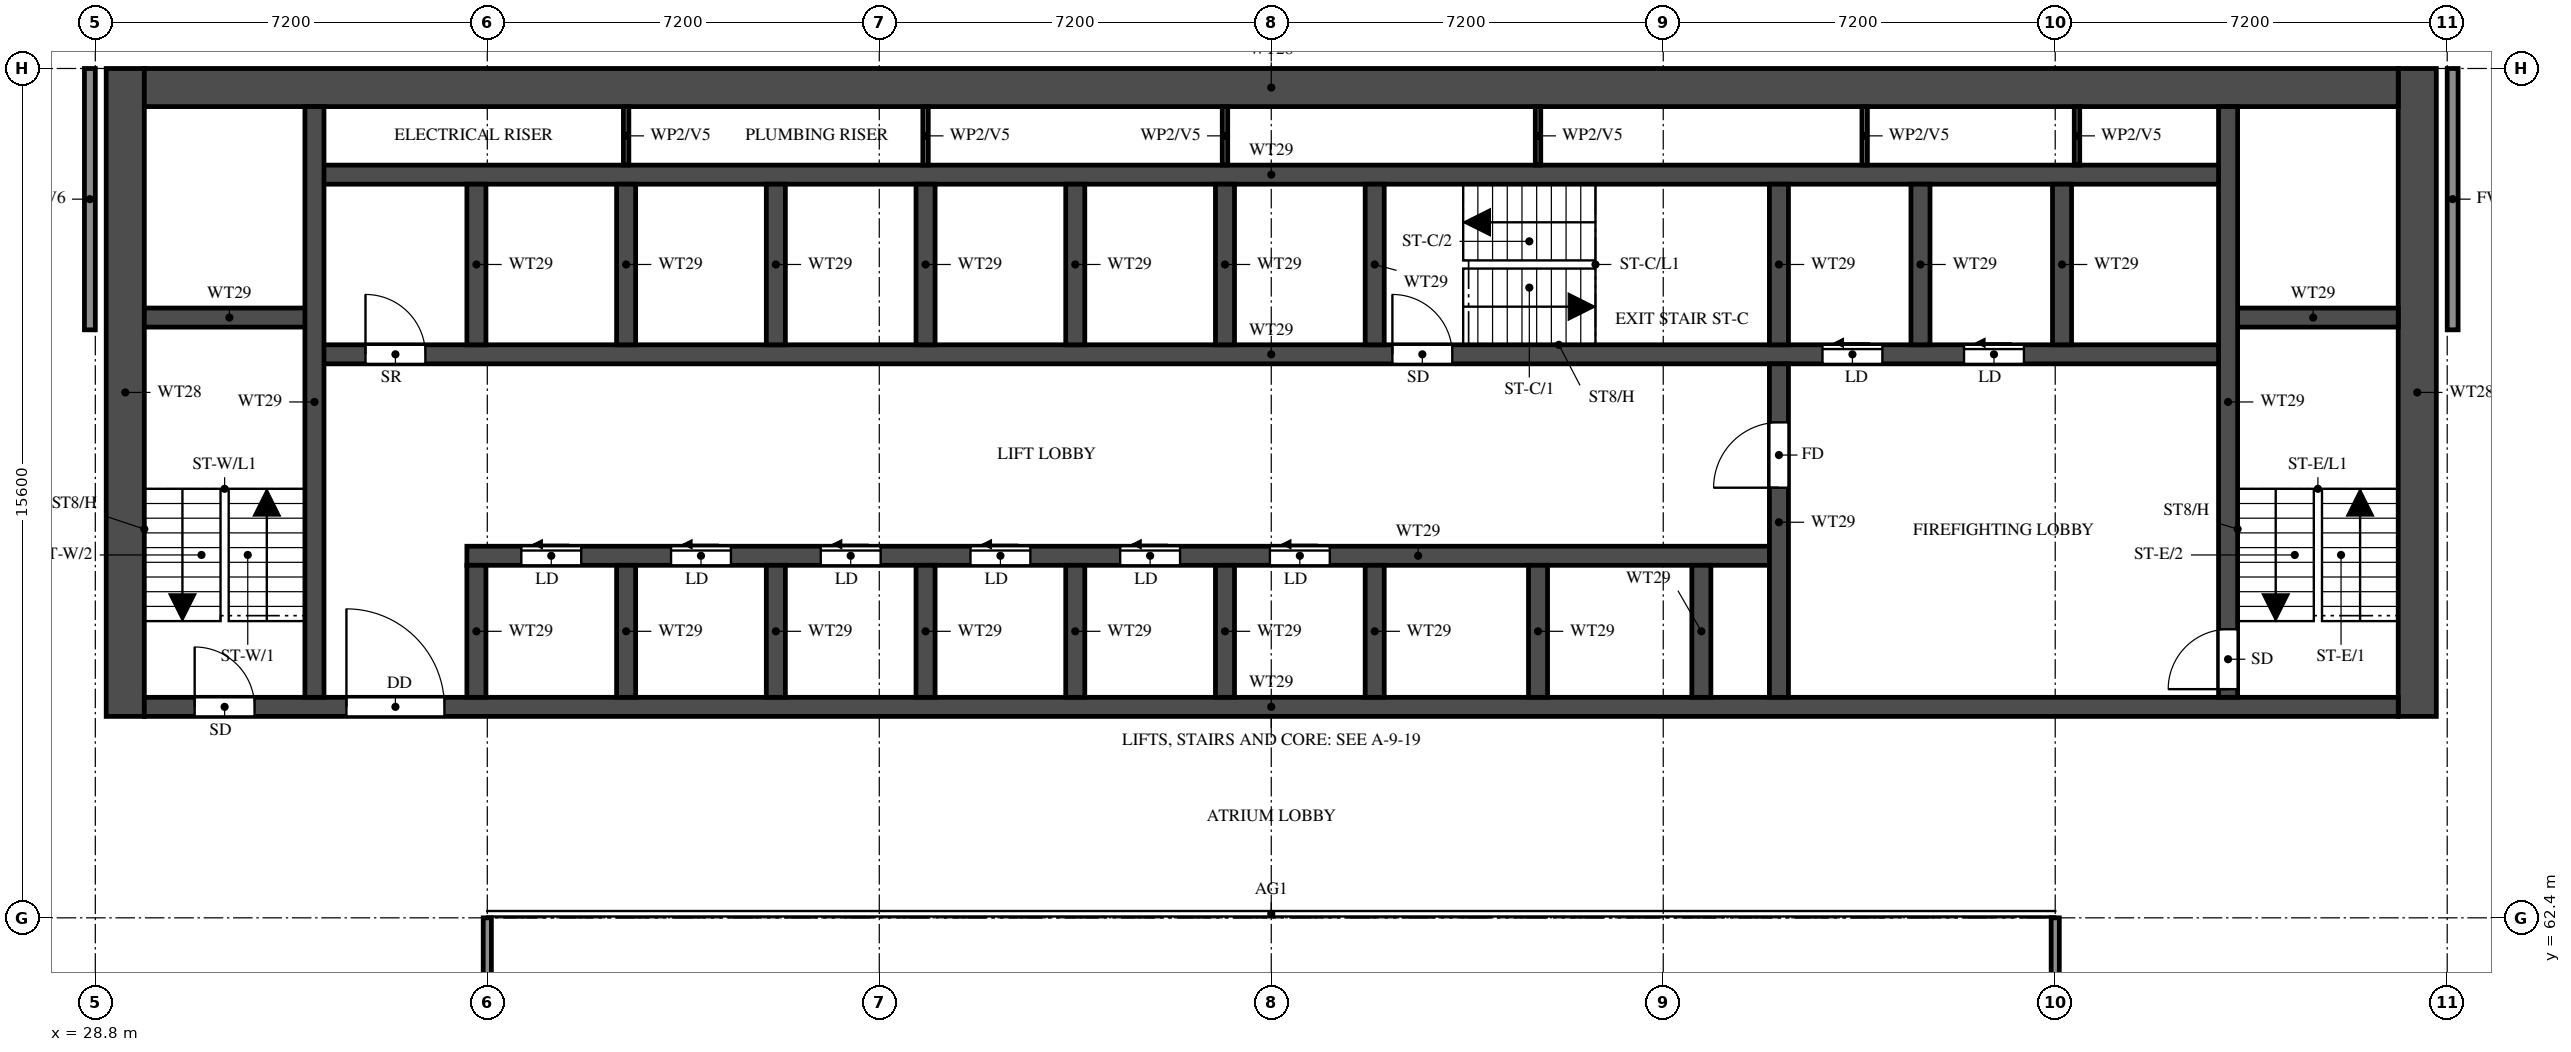
"""IFC4 building model, lengths in metres.
Left out: names, types, materials, properties, quantities, classifications, styles, units other than length and angle.
Written with IfcOpenShell. Run it as: python <this file> out.ifc"""

import sys

from ifc_helpers import new_model, si_unit, direction, frame, frame_2d, origin, place, context, subcontext, project, spatial, rectangle, extrude, element, fill, save


model = new_model("IFC4")
c1 = context("Model", 3, precision=1e-05, world=origin(), true_north=direction((0.0, 1.0)))
c2 = subcontext(c1, "Body", "Model", "MODEL_VIEW")
j1 = project(units=[si_unit("LENGTHUNIT", "METRE"), si_unit("PLANEANGLEUNIT", "RADIAN")], contexts=[c1])
p1 = place(None, origin())
s1 = spatial("IfcSite", under=j1, at=p1, CompositionType="ELEMENT")
p2 = place(p1, origin())
s2 = spatial("IfcBuilding", under=s1, at=p2, CompositionType="ELEMENT")
p3 = place(p2, frame((0.0, 0.0, 134.0)))
s3 = spatial("IfcBuildingStorey", under=s2, at=p3, CompositionType="ELEMENT", Elevation=134.0)
for number, where, z_axis, x_axis in (
    (1, (29.35, 66.1, 0.0), (0.0, 0.0, 1.0), (0.0, 1.0, 0.0)),
    (2, (71.45, 66.1, 0.0), (0.0, 0.0, 1.0), (0.0, 1.0, 0.0)),
):
    element("IfcWall", number, at=place(p3, frame(where, z_axis=z_axis, x_axis=x_axis)), inside=s3, PredefinedType="SHEAR", context=c2, shape_type="SweptSolid", body=[
        extrude(rectangle(XDim=11.9, YDim=0.7, at=frame_2d((5.95, 0.0))), origin(), (0.0, 0.0, 1.0), 3.15),
    ])
p4 = place(p3, frame((29.7, 77.65, 0.0), z_axis=(0.0, 0.0, 1.0), x_axis=(1.0, 0.0, 0.0)))
e3 = element("IfcWall", 3, at=p4, inside=s3, PredefinedType="SHEAR", context=c2, shape_type="SweptSolid", body=[
    extrude(rectangle(XDim=41.4, YDim=0.7, at=frame_2d((20.7, 0.0))), origin(), (0.0, 0.0, 1.0), 3.15),
])
p5 = place(p3, frame((29.7, 66.275, 0.0), z_axis=(0.0, 0.0, 1.0), x_axis=(1.0, 0.0, 0.0)))
e4 = element("IfcWall", 4, at=p5, inside=s3, PredefinedType="SHEAR", context=c2, shape_type="SweptSolid", body=[
    extrude(rectangle(XDim=41.4, YDim=0.35, at=frame_2d((20.7, 0.0))), origin(), (0.0, 0.0, 1.0), 3.15),
])
p6 = place(p5, frame((0.925, 0.0, 0.0)))
e5 = element("IfcOpeningElement", 5, at=p6, cuts=e4, PredefinedType="OPENING", context=c2, shape_type="SweptSolid", body=[
    extrude(rectangle(XDim=1.1, YDim=2.1, at=frame_2d((0.55, 1.05))), frame((0.0, 0.185, 0.0), z_axis=(0.0, -1.0, 0.0), x_axis=(1.0, 0.0, 0.0)), (0.0, 0.0, 1.0), 0.37),
])
p7 = place(p5, frame((3.712, 0.0, 0.0)))
e6 = element("IfcOpeningElement", 6, at=p7, cuts=e4, PredefinedType="OPENING", context=c2, shape_type="SweptSolid", body=[
    extrude(rectangle(XDim=1.8, YDim=2.1, at=frame_2d((0.9, 1.05))), frame((0.0, 0.185, 0.0), z_axis=(0.0, -1.0, 0.0), x_axis=(1.0, 0.0, 0.0)), (0.0, 0.0, 1.0), 0.37),
])
p8 = place(p3, frame((35.625, 69.05, 0.0), z_axis=(0.0, 0.0, 1.0), x_axis=(1.0, 0.0, 0.0)))
e7 = element("IfcWall", 7, at=p8, inside=s3, PredefinedType="SHEAR", context=c2, shape_type="SweptSolid", body=[
    extrude(rectangle(XDim=24.1, YDim=0.35, at=frame_2d((12.05, 0.0))), origin(), (0.0, 0.0, 1.0), 3.15),
])
p9 = place(p8, frame((1.0, 0.0, 0.0)))
e8 = element("IfcOpeningElement", 8, at=p9, cuts=e7, PredefinedType="OPENING", context=c2, shape_type="SweptSolid", body=[
    extrude(rectangle(XDim=1.1, YDim=2.1, at=frame_2d((0.55, 1.05))), frame((0.0, 0.185, 0.0), z_axis=(0.0, -1.0, 0.0), x_axis=(1.0, 0.0, 0.0)), (0.0, 0.0, 1.0), 0.37),
])
p10 = place(p8, frame((3.75, 0.0, 0.0)))
e9 = element("IfcOpeningElement", 9, at=p10, cuts=e7, PredefinedType="OPENING", context=c2, shape_type="SweptSolid", body=[
    extrude(rectangle(XDim=1.1, YDim=2.1, at=frame_2d((0.55, 1.05))), frame((0.0, 0.185, 0.0), z_axis=(0.0, -1.0, 0.0), x_axis=(1.0, 0.0, 0.0)), (0.0, 0.0, 1.0), 0.37),
])
p11 = place(p8, frame((6.5, 0.0, 0.0)))
e10 = element("IfcOpeningElement", 10, at=p11, cuts=e7, PredefinedType="OPENING", context=c2, shape_type="SweptSolid", body=[
    extrude(rectangle(XDim=1.1, YDim=2.1, at=frame_2d((0.55, 1.05))), frame((0.0, 0.185, 0.0), z_axis=(0.0, -1.0, 0.0), x_axis=(1.0, 0.0, 0.0)), (0.0, 0.0, 1.0), 0.37),
])
p12 = place(p8, frame((9.25, 0.0, 0.0)))
e11 = element("IfcOpeningElement", 11, at=p12, cuts=e7, PredefinedType="OPENING", context=c2, shape_type="SweptSolid", body=[
    extrude(rectangle(XDim=1.1, YDim=2.1, at=frame_2d((0.55, 1.05))), frame((0.0, 0.185, 0.0), z_axis=(0.0, -1.0, 0.0), x_axis=(1.0, 0.0, 0.0)), (0.0, 0.0, 1.0), 0.37),
])
p13 = place(p8, frame((12.0, 0.0, 0.0)))
e12 = element("IfcOpeningElement", 12, at=p13, cuts=e7, PredefinedType="OPENING", context=c2, shape_type="SweptSolid", body=[
    extrude(rectangle(XDim=1.1, YDim=2.1, at=frame_2d((0.55, 1.05))), frame((0.0, 0.185, 0.0), z_axis=(0.0, -1.0, 0.0), x_axis=(1.0, 0.0, 0.0)), (0.0, 0.0, 1.0), 0.37),
])
p14 = place(p8, frame((14.75, 0.0, 0.0)))
e13 = element("IfcOpeningElement", 13, at=p14, cuts=e7, PredefinedType="OPENING", context=c2, shape_type="SweptSolid", body=[
    extrude(rectangle(XDim=1.1, YDim=2.1, at=frame_2d((0.55, 1.05))), frame((0.0, 0.185, 0.0), z_axis=(0.0, -1.0, 0.0), x_axis=(1.0, 0.0, 0.0)), (0.0, 0.0, 1.0), 0.37),
])
p15 = place(p3, frame((32.825, 72.75, 0.0), z_axis=(0.0, 0.0, 1.0), x_axis=(1.0, 0.0, 0.0)))
e14 = element("IfcWall", 14, at=p15, inside=s3, PredefinedType="SHEAR", context=c2, shape_type="SweptSolid", body=[
    extrude(rectangle(XDim=35.15, YDim=0.35, at=frame_2d((17.575, 0.0))), origin(), (0.0, 0.0, 1.0), 3.15),
])
p16 = place(p15, frame((19.8, 0.0, 0.0)))
e15 = element("IfcOpeningElement", 15, at=p16, cuts=e14, PredefinedType="OPENING", context=c2, shape_type="SweptSolid", body=[
    extrude(rectangle(XDim=1.1, YDim=2.1, at=frame_2d((0.55, 1.05))), frame((0.0, 0.185, 0.0), z_axis=(0.0, -1.0, 0.0), x_axis=(1.0, 0.0, 0.0)), (0.0, 0.0, 1.0), 0.37),
])
p17 = place(p15, frame((27.7, 0.0, 0.0)))
e16 = element("IfcOpeningElement", 16, at=p17, cuts=e14, PredefinedType="OPENING", context=c2, shape_type="SweptSolid", body=[
    extrude(rectangle(XDim=1.1, YDim=2.1, at=frame_2d((0.55, 1.05))), frame((0.0, 0.185, 0.0), z_axis=(0.0, -1.0, 0.0), x_axis=(1.0, 0.0, 0.0)), (0.0, 0.0, 1.0), 0.37),
])
p18 = place(p15, frame((30.3, 0.0, 0.0)))
e17 = element("IfcOpeningElement", 17, at=p18, cuts=e14, PredefinedType="OPENING", context=c2, shape_type="SweptSolid", body=[
    extrude(rectangle(XDim=1.1, YDim=2.1, at=frame_2d((0.55, 1.05))), frame((0.0, 0.185, 0.0), z_axis=(0.0, -1.0, 0.0), x_axis=(1.0, 0.0, 0.0)), (0.0, 0.0, 1.0), 0.37),
])
p19 = place(p15, frame((0.938, 0.0, 0.0)))
e18 = element("IfcOpeningElement", 18, at=p19, cuts=e14, PredefinedType="OPENING", context=c2, shape_type="SweptSolid", body=[
    extrude(rectangle(XDim=1.1, YDim=2.1, at=frame_2d((0.55, 1.05))), frame((0.0, 0.185, 0.0), z_axis=(0.0, -1.0, 0.0), x_axis=(1.0, 0.0, 0.0)), (0.0, 0.0, 1.0), 0.37),
])
p20 = place(p3, frame((32.825, 76.05, 0.0), z_axis=(0.0, 0.0, 1.0), x_axis=(1.0, 0.0, 0.0)))
e19 = element("IfcWall", 19, at=p20, inside=s3, PredefinedType="SHEAR", context=c2, shape_type="SweptSolid", body=[
    extrude(rectangle(XDim=35.15, YDim=0.35, at=frame_2d((17.575, 0.0))), origin(), (0.0, 0.0, 1.0), 3.15),
])
for number, where, z_axis, x_axis in (
    (20, (29.7, 73.425, 0.0), (0.0, 0.0, 1.0), (1.0, 0.0, 0.0)),
    (21, (67.975, 73.425, 0.0), (0.0, 0.0, 1.0), (1.0, 0.0, 0.0)),
):
    element("IfcWall", number, at=place(p3, frame(where, z_axis=z_axis, x_axis=x_axis)), inside=s3, PredefinedType="SHEAR", context=c2, shape_type="SweptSolid", body=[
        extrude(rectangle(XDim=3.125, YDim=0.35, at=frame_2d((1.562, 0.0))), origin(), (0.0, 0.0, 1.0), 3.15),
    ])
p21 = place(p3, frame((32.825, 66.45, 0.0), z_axis=(0.0, 0.0, 1.0), x_axis=(0.0, 1.0, 0.0)))
e22 = element("IfcWall", 22, at=p21, inside=s3, PredefinedType="SHEAR", context=c2, shape_type="SweptSolid", body=[
    extrude(rectangle(XDim=10.85, YDim=0.35, at=frame_2d((5.425, 0.0))), origin(), (0.0, 0.0, 1.0), 3.15),
])
p22 = place(p3, frame((67.975, 66.45, 0.0), z_axis=(0.0, 0.0, 1.0), x_axis=(0.0, 1.0, 0.0)))
e23 = element("IfcWall", 23, at=p22, inside=s3, PredefinedType="SHEAR", context=c2, shape_type="SweptSolid", body=[
    extrude(rectangle(XDim=10.85, YDim=0.35, at=frame_2d((5.425, 0.0))), origin(), (0.0, 0.0, 1.0), 3.15),
])
p23 = place(p22, frame((0.15, 0.0, 0.0)))
e24 = element("IfcOpeningElement", 24, at=p23, cuts=e23, PredefinedType="OPENING", context=c2, shape_type="SweptSolid", body=[
    extrude(rectangle(XDim=1.1, YDim=2.1, at=frame_2d((0.55, 1.05))), frame((0.0, 0.185, 0.0), z_axis=(0.0, -1.0, 0.0), x_axis=(1.0, 0.0, 0.0)), (0.0, 0.0, 1.0), 0.37),
])
p24 = place(p3, frame((59.725, 66.45, 0.0), z_axis=(0.0, 0.0, 1.0), x_axis=(0.0, 1.0, 0.0)))
e25 = element("IfcWall", 25, at=p24, inside=s3, PredefinedType="SHEAR", context=c2, shape_type="SweptSolid", body=[
    extrude(rectangle(XDim=6.125, YDim=0.35, at=frame_2d((3.062, 0.0))), origin(), (0.0, 0.0, 1.0), 3.15),
])
p25 = place(p24, frame((3.85, 0.0, 0.0)))
e26 = element("IfcOpeningElement", 26, at=p25, cuts=e25, PredefinedType="OPENING", context=c2, shape_type="SweptSolid", body=[
    extrude(rectangle(XDim=1.2, YDim=2.1, at=frame_2d((0.6, 1.05))), frame((0.0, 0.185, 0.0), z_axis=(0.0, -1.0, 0.0), x_axis=(1.0, 0.0, 0.0)), (0.0, 0.0, 1.0), 0.37),
])
p26 = place(p3, frame((59.725, 72.925, 0.0), z_axis=(0.0, 0.0, 1.0), x_axis=(0.0, 1.0, 0.0)))
e27 = element("IfcWall", 27, at=p26, inside=s3, PredefinedType="SHEAR", context=c2, shape_type="SweptSolid", body=[
    extrude(rectangle(XDim=2.95, YDim=0.35, at=frame_2d((1.475, 0.0))), origin(), (0.0, 0.0, 1.0), 3.15),
])
for number, where, z_axis, x_axis in (
    (28, (35.8, 66.45, 0.0), (0.0, 0.0, 1.0), (0.0, 1.0, 0.0)),
    (29, (38.55, 66.45, 0.0), (0.0, 0.0, 1.0), (0.0, 1.0, 0.0)),
    (30, (41.3, 66.45, 0.0), (0.0, 0.0, 1.0), (0.0, 1.0, 0.0)),
    (31, (44.05, 66.45, 0.0), (0.0, 0.0, 1.0), (0.0, 1.0, 0.0)),
    (32, (46.8, 66.45, 0.0), (0.0, 0.0, 1.0), (0.0, 1.0, 0.0)),
    (33, (49.55, 66.45, 0.0), (0.0, 0.0, 1.0), (0.0, 1.0, 0.0)),
    (34, (52.3, 66.45, 0.0), (0.0, 0.0, 1.0), (0.0, 1.0, 0.0)),
    (35, (55.3, 66.45, 0.0), (0.0, 0.0, 1.0), (0.0, 1.0, 0.0)),
    (36, (58.3, 66.45, 0.0), (0.0, 0.0, 1.0), (0.0, 1.0, 0.0)),
):
    element("IfcWall", number, at=place(p3, frame(where, z_axis=z_axis, x_axis=x_axis)), inside=s3, PredefinedType="SHEAR", context=c2, shape_type="SweptSolid", body=[
        extrude(rectangle(XDim=2.425, YDim=0.35, at=frame_2d((1.212, 0.0))), origin(), (0.0, 0.0, 1.0), 3.15),
    ])
for number, where, z_axis, x_axis in (
    (37, (35.8, 72.925, 0.0), (0.0, 0.0, 1.0), (0.0, 1.0, 0.0)),
    (38, (38.55, 72.925, 0.0), (0.0, 0.0, 1.0), (0.0, 1.0, 0.0)),
    (39, (41.3, 72.925, 0.0), (0.0, 0.0, 1.0), (0.0, 1.0, 0.0)),
    (40, (44.05, 72.925, 0.0), (0.0, 0.0, 1.0), (0.0, 1.0, 0.0)),
    (41, (46.8, 72.925, 0.0), (0.0, 0.0, 1.0), (0.0, 1.0, 0.0)),
    (42, (49.55, 72.925, 0.0), (0.0, 0.0, 1.0), (0.0, 1.0, 0.0)),
    (43, (52.3, 72.925, 0.0), (0.0, 0.0, 1.0), (0.0, 1.0, 0.0)),
    (44, (62.325, 72.925, 0.0), (0.0, 0.0, 1.0), (0.0, 1.0, 0.0)),
    (45, (64.925, 72.925, 0.0), (0.0, 0.0, 1.0), (0.0, 1.0, 0.0)),
):
    element("IfcWall", number, at=place(p3, frame(where, z_axis=z_axis, x_axis=x_axis)), inside=s3, PredefinedType="SHEAR", context=c2, shape_type="SweptSolid", body=[
        extrude(rectangle(XDim=2.95, YDim=0.35, at=frame_2d((1.475, 0.0))), origin(), (0.0, 0.0, 1.0), 3.15),
    ])
for number, where, z_axis, x_axis in (
    (46, (38.55, 76.225, 0.0), (0.0, 0.0, 1.0), (0.0, 1.0, 0.0)),
    (47, (44.05, 76.225, 0.0), (0.0, 0.0, 1.0), (0.0, 1.0, 0.0)),
    (48, (49.55, 76.225, 0.0), (0.0, 0.0, 1.0), (0.0, 1.0, 0.0)),
    (49, (55.3, 76.225, 0.0), (0.0, 0.0, 1.0), (0.0, 1.0, 0.0)),
    (50, (61.3, 76.225, 0.0), (0.0, 0.0, 1.0), (0.0, 1.0, 0.0)),
    (51, (65.2, 76.225, 0.0), (0.0, 0.0, 1.0), (0.0, 1.0, 0.0)),
):
    element("IfcWall", number, at=place(p3, frame(where, z_axis=z_axis, x_axis=x_axis)), inside=s3, PredefinedType="PARTITIONING", context=c2, shape_type="SweptSolid", body=[
        extrude(rectangle(XDim=1.075, YDim=0.1, at=frame_2d((0.538, 0.0))), origin(), (0.0, 0.0, 1.0), 3.15),
    ])
for number, where, z_axis, x_axis in (
    (52, (28.7, 73.2, 0.0), (0.0, 0.0, 1.0), (0.0, 1.0, 0.0)),
    (53, (72.1, 73.2, 0.0), (0.0, 0.0, 1.0), (0.0, 1.0, 0.0)),
):
    element("IfcWall", number, at=place(p3, frame(where, z_axis=z_axis, x_axis=x_axis)), inside=s3, PredefinedType="SOLIDWALL", context=c2, shape_type="SweptSolid", body=[
        extrude(rectangle(XDim=4.8, YDim=0.2, at=frame_2d((2.4, 0.0))), origin(), (0.0, 0.0, 1.0), 3.15),
    ])
for number, where, z_axis, x_axis in (
    (54, (36.0, 48.0, 0.0), (0.0, 0.0, 1.0), (0.0, 1.0, 0.0)),
    (55, (64.8, 48.0, 0.0), (0.0, 0.0, 1.0), (0.0, 1.0, 0.0)),
):
    element("IfcWall", number, at=place(p3, frame(where, z_axis=z_axis, x_axis=x_axis)), inside=s3, PredefinedType="SOLIDWALL", context=c2, shape_type="SweptSolid", body=[
        extrude(rectangle(XDim=14.4, YDim=0.15, at=frame_2d((7.2, 0.0))), origin(), (0.0, 0.0, 1.0), 2.25),
    ])
p27 = place(p6, origin())
e56 = element("IfcDoor", 56, at=p27, inside=s3, OperationType="SINGLE_SWING_LEFT", PredefinedType="DOOR", context=c2, shape_type="SweptSolid", body=[
    extrude(rectangle(XDim=1.1, YDim=2.1, at=frame_2d((0.55, 1.05))), frame((0.0, 0.025, 0.0), z_axis=(0.0, -1.0, 0.0), x_axis=(1.0, 0.0, 0.0)), (0.0, 0.0, 1.0), 0.05),
])
fill(e5, e56)
p28 = place(p16, origin())
e57 = element("IfcDoor", 57, at=p28, inside=s3, OperationType="SINGLE_SWING_LEFT", PredefinedType="DOOR", context=c2, shape_type="SweptSolid", body=[
    extrude(rectangle(XDim=1.1, YDim=2.1, at=frame_2d((0.55, 1.05))), frame((0.0, 0.025, 0.0), z_axis=(0.0, -1.0, 0.0), x_axis=(1.0, 0.0, 0.0)), (0.0, 0.0, 1.0), 0.05),
])
fill(e15, e57)
p29 = place(p23, origin())
e58 = element("IfcDoor", 58, at=p29, inside=s3, OperationType="SINGLE_SWING_LEFT", PredefinedType="DOOR", context=c2, shape_type="SweptSolid", body=[
    extrude(rectangle(XDim=1.1, YDim=2.1, at=frame_2d((0.55, 1.05))), frame((0.0, 0.025, 0.0), z_axis=(0.0, -1.0, 0.0), x_axis=(1.0, 0.0, 0.0)), (0.0, 0.0, 1.0), 0.05),
])
fill(e24, e58)
p30 = place(p7, origin())
e59 = element("IfcDoor", 59, at=p30, inside=s3, OperationType="DOUBLE_DOOR_SINGLE_SWING", PredefinedType="DOOR", context=c2, shape_type="SweptSolid", body=[
    extrude(rectangle(XDim=1.8, YDim=2.1, at=frame_2d((0.9, 1.05))), frame((0.0, 0.025, 0.0), z_axis=(0.0, -1.0, 0.0), x_axis=(1.0, 0.0, 0.0)), (0.0, 0.0, 1.0), 0.05),
])
fill(e6, e59)
p31 = place(p25, origin())
e60 = element("IfcDoor", 60, at=p31, inside=s3, OperationType="SINGLE_SWING_LEFT", PredefinedType="DOOR", context=c2, shape_type="SweptSolid", body=[
    extrude(rectangle(XDim=1.2, YDim=2.1, at=frame_2d((0.6, 1.05))), frame((0.0, 0.025, 0.0), z_axis=(0.0, -1.0, 0.0), x_axis=(1.0, 0.0, 0.0)), (0.0, 0.0, 1.0), 0.05),
])
fill(e26, e60)
p32 = place(p17, origin())
e61 = element("IfcDoor", 61, at=p32, inside=s3, OperationType="SLIDING_TO_LEFT", PredefinedType="DOOR", context=c2, shape_type="SweptSolid", body=[
    extrude(rectangle(XDim=1.1, YDim=2.1, at=frame_2d((0.55, 1.05))), frame((0.0, 0.025, 0.0), z_axis=(0.0, -1.0, 0.0), x_axis=(1.0, 0.0, 0.0)), (0.0, 0.0, 1.0), 0.05),
])
fill(e16, e61)
p33 = place(p18, origin())
e62 = element("IfcDoor", 62, at=p33, inside=s3, OperationType="SLIDING_TO_LEFT", PredefinedType="DOOR", context=c2, shape_type="SweptSolid", body=[
    extrude(rectangle(XDim=1.1, YDim=2.1, at=frame_2d((0.55, 1.05))), frame((0.0, 0.025, 0.0), z_axis=(0.0, -1.0, 0.0), x_axis=(1.0, 0.0, 0.0)), (0.0, 0.0, 1.0), 0.05),
])
fill(e17, e62)
p34 = place(p9, origin())
e63 = element("IfcDoor", 63, at=p34, inside=s3, OperationType="SLIDING_TO_LEFT", PredefinedType="DOOR", context=c2, shape_type="SweptSolid", body=[
    extrude(rectangle(XDim=1.1, YDim=2.1, at=frame_2d((0.55, 1.05))), frame((0.0, 0.025, 0.0), z_axis=(0.0, -1.0, 0.0), x_axis=(1.0, 0.0, 0.0)), (0.0, 0.0, 1.0), 0.05),
])
fill(e8, e63)
p35 = place(p10, origin())
e64 = element("IfcDoor", 64, at=p35, inside=s3, OperationType="SLIDING_TO_LEFT", PredefinedType="DOOR", context=c2, shape_type="SweptSolid", body=[
    extrude(rectangle(XDim=1.1, YDim=2.1, at=frame_2d((0.55, 1.05))), frame((0.0, 0.025, 0.0), z_axis=(0.0, -1.0, 0.0), x_axis=(1.0, 0.0, 0.0)), (0.0, 0.0, 1.0), 0.05),
])
fill(e9, e64)
p36 = place(p11, origin())
e65 = element("IfcDoor", 65, at=p36, inside=s3, OperationType="SLIDING_TO_LEFT", PredefinedType="DOOR", context=c2, shape_type="SweptSolid", body=[
    extrude(rectangle(XDim=1.1, YDim=2.1, at=frame_2d((0.55, 1.05))), frame((0.0, 0.025, 0.0), z_axis=(0.0, -1.0, 0.0), x_axis=(1.0, 0.0, 0.0)), (0.0, 0.0, 1.0), 0.05),
])
fill(e10, e65)
p37 = place(p12, origin())
e66 = element("IfcDoor", 66, at=p37, inside=s3, OperationType="SLIDING_TO_LEFT", PredefinedType="DOOR", context=c2, shape_type="SweptSolid", body=[
    extrude(rectangle(XDim=1.1, YDim=2.1, at=frame_2d((0.55, 1.05))), frame((0.0, 0.025, 0.0), z_axis=(0.0, -1.0, 0.0), x_axis=(1.0, 0.0, 0.0)), (0.0, 0.0, 1.0), 0.05),
])
fill(e11, e66)
p38 = place(p13, origin())
e67 = element("IfcDoor", 67, at=p38, inside=s3, OperationType="SLIDING_TO_LEFT", PredefinedType="DOOR", context=c2, shape_type="SweptSolid", body=[
    extrude(rectangle(XDim=1.1, YDim=2.1, at=frame_2d((0.55, 1.05))), frame((0.0, 0.025, 0.0), z_axis=(0.0, -1.0, 0.0), x_axis=(1.0, 0.0, 0.0)), (0.0, 0.0, 1.0), 0.05),
])
fill(e12, e67)
p39 = place(p14, origin())
e68 = element("IfcDoor", 68, at=p39, inside=s3, OperationType="SLIDING_TO_LEFT", PredefinedType="DOOR", context=c2, shape_type="SweptSolid", body=[
    extrude(rectangle(XDim=1.1, YDim=2.1, at=frame_2d((0.55, 1.05))), frame((0.0, 0.025, 0.0), z_axis=(0.0, -1.0, 0.0), x_axis=(1.0, 0.0, 0.0)), (0.0, 0.0, 1.0), 0.05),
])
fill(e13, e68)
p40 = place(p19, origin())
e69 = element("IfcDoor", 69, at=p40, inside=s3, OperationType="SINGLE_SWING_LEFT", PredefinedType="DOOR", context=c2, shape_type="SweptSolid", body=[
    extrude(rectangle(XDim=1.1, YDim=2.1, at=frame_2d((0.55, 1.05))), frame((0.0, 0.025, 0.0), z_axis=(0.0, -1.0, 0.0), x_axis=(1.0, 0.0, 0.0)), (0.0, 0.0, 1.0), 0.05),
])
fill(e18, e69)
save(model, sys.argv[1])
